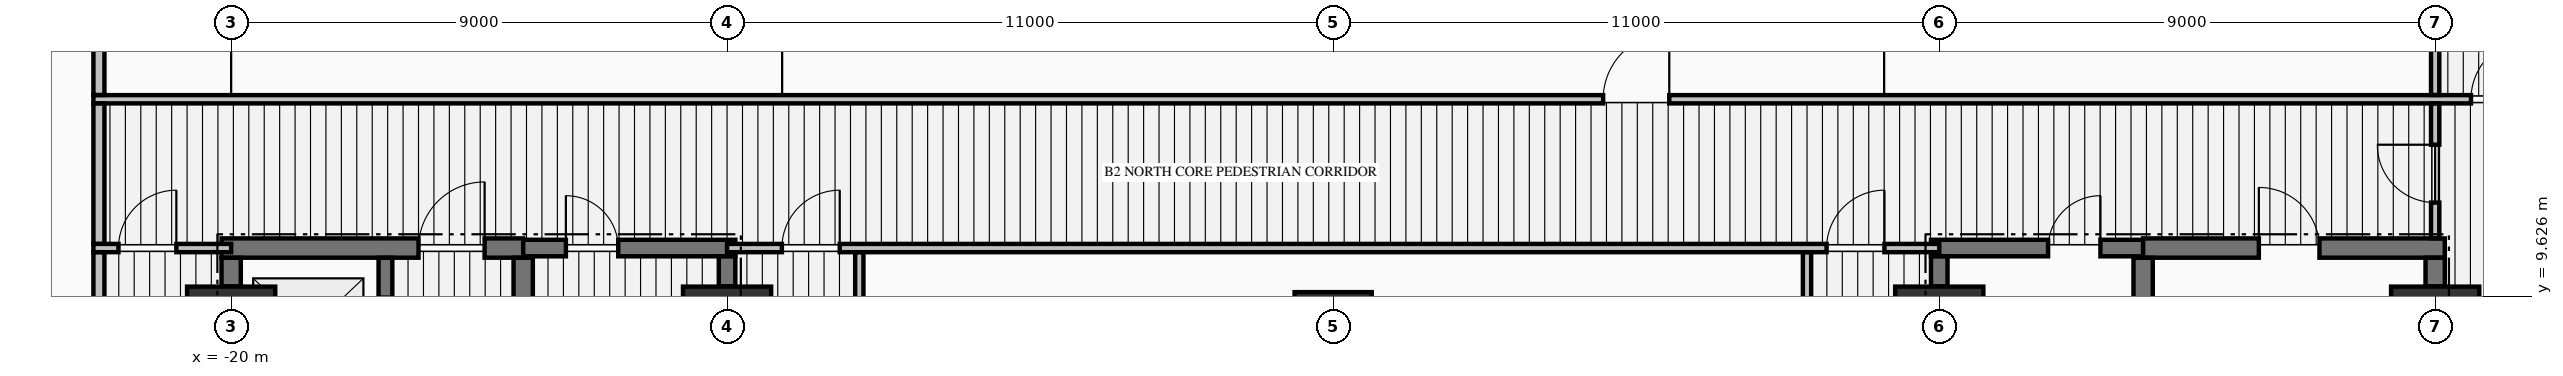
"""IFC4 building model, lengths in metres.
Left out: names, types, materials, properties, quantities, classifications, styles, units other than length and angle.
Written with IfcOpenShell. Run it as: python <this file> out.ifc"""

import sys

from ifc_helpers import new_model, si_unit, direction, frame, frame_2d, origin, origin_2d, place, context, subcontext, project, spatial, rectangle, extrude, element, fill, save


model = new_model("IFC4")
c1 = context("Model", 3, precision=1e-05, world=origin(), true_north=direction((0.0, 1.0)))
c2 = subcontext(c1, "Body", "Model", "MODEL_VIEW")
j1 = project(units=[si_unit("LENGTHUNIT", "METRE"), si_unit("PLANEANGLEUNIT", "RADIAN")], contexts=[c1])
p1 = place(None, origin())
s1 = spatial("IfcSite", under=j1, at=p1, CompositionType="ELEMENT")
p2 = place(p1, origin())
s2 = spatial("IfcBuilding", under=s1, at=p2, CompositionType="ELEMENT")
p3 = place(p2, frame((0.0, 0.0, -9.1)))
s3 = spatial("IfcBuildingStorey", under=s2, at=p3, CompositionType="ELEMENT", Elevation=-9.1)
for number, where, z_axis, x_axis in (
    (1, (-20.0, 9.0, -0.45), (0.0, 0.0, 1.0), (1.0, 0.0, 0.0)),
    (2, (-11.0, 9.0, -0.45), (0.0, 0.0, 1.0), (1.0, 0.0, 0.0)),
):
    element("IfcColumn", number, at=place(p3, frame(where, z_axis=z_axis, x_axis=x_axis)), inside=s3, PredefinedType="COLUMN", context=c2, shape_type="SweptSolid", body=[
        extrude(rectangle(XDim=1.6, YDim=1.6, at=origin_2d()), origin(), (0.0, 0.0, 1.0), 4.65),
    ])
p4 = place(p3, frame((0.0, 9.0, -0.45), z_axis=(0.0, 0.0, 1.0), x_axis=(1.0, 0.0, 0.0)))
e3 = element("IfcColumn", 3, at=p4, inside=s3, PredefinedType="COLUMN", context=c2, shape_type="SweptSolid", body=[
    extrude(rectangle(XDim=1.4, YDim=1.4, at=origin_2d()), origin(), (0.0, 0.0, 1.0), 4.65),
])
for number, where, z_axis, x_axis in (
    (4, (11.0, 9.0, -0.45), (0.0, 0.0, 1.0), (1.0, 0.0, 0.0)),
    (5, (20.0, 9.0, -0.45), (0.0, 0.0, 1.0), (1.0, 0.0, 0.0)),
):
    element("IfcColumn", number, at=place(p3, frame(where, z_axis=z_axis, x_axis=x_axis)), inside=s3, PredefinedType="COLUMN", context=c2, shape_type="SweptSolid", body=[
        extrude(rectangle(XDim=1.6, YDim=1.6, at=origin_2d()), origin(), (0.0, 0.0, 1.0), 4.65),
    ])
p5 = place(p3, frame((-20.175, 10.5, 0.0), z_axis=(0.0, 0.0, 1.0), x_axis=(1.0, 0.0, 0.0)))
e6 = element("IfcWall", 6, at=p5, inside=s3, PredefinedType="SHEAR", context=c2, shape_type="SweptSolid", body=[
    extrude(rectangle(XDim=5.475, YDim=0.35, at=frame_2d((2.738, 0.0))), origin(), (0.0, 0.0, 1.0), 4.2),
])
p6 = place(p5, frame((3.575, 0.0, 0.0)))
e7 = element("IfcOpeningElement", 7, at=p6, cuts=e6, PredefinedType="OPENING", context=c2, shape_type="SweptSolid", body=[
    extrude(rectangle(XDim=1.2, YDim=2.15, at=frame_2d((0.6, 1.075))), frame((0.0, 0.185, 0.0), z_axis=(0.0, -1.0, 0.0), x_axis=(1.0, 0.0, 0.0)), (0.0, 0.0, 1.0), 0.37),
])
p7 = place(p3, frame((-14.7, 10.5, 0.0), z_axis=(0.0, 0.0, 1.0), x_axis=(1.0, 0.0, 0.0)))
e8 = element("IfcWall", 8, at=p7, inside=s3, PredefinedType="SHEAR", context=c2, shape_type="SweptSolid", body=[
    extrude(rectangle(XDim=3.85, YDim=0.3, at=frame_2d((1.925, 0.0))), origin(), (0.0, 0.0, 1.0), 4.2),
])
p8 = place(p7, frame((0.775, 0.0, 0.0)))
e9 = element("IfcOpeningElement", 9, at=p8, cuts=e8, PredefinedType="OPENING", context=c2, shape_type="SweptSolid", body=[
    extrude(rectangle(XDim=0.95, YDim=2.15, at=frame_2d((0.475, 1.075))), frame((0.0, 0.16, 0.0), z_axis=(0.0, -1.0, 0.0), x_axis=(1.0, 0.0, 0.0)), (0.0, 0.0, 1.0), 0.32),
])
p9 = place(p3, frame((10.85, 10.5, 0.0), z_axis=(0.0, 0.0, 1.0), x_axis=(1.0, 0.0, 0.0)))
e10 = element("IfcWall", 10, at=p9, inside=s3, PredefinedType="SHEAR", context=c2, shape_type="SweptSolid", body=[
    extrude(rectangle(XDim=3.85, YDim=0.3, at=frame_2d((1.925, 0.0))), origin(), (0.0, 0.0, 1.0), 4.2),
])
p10 = place(p9, frame((2.125, 0.0, 0.0)))
e11 = element("IfcOpeningElement", 11, at=p10, cuts=e10, PredefinedType="OPENING", context=c2, shape_type="SweptSolid", body=[
    extrude(rectangle(XDim=0.95, YDim=2.15, at=frame_2d((0.475, 1.075))), frame((0.0, 0.16, 0.0), z_axis=(0.0, -1.0, 0.0), x_axis=(1.0, 0.0, 0.0)), (0.0, 0.0, 1.0), 0.32),
])
p11 = place(p3, frame((14.7, 10.5, 0.0), z_axis=(0.0, 0.0, 1.0), x_axis=(1.0, 0.0, 0.0)))
e12 = element("IfcWall", 12, at=p11, inside=s3, PredefinedType="SHEAR", context=c2, shape_type="SweptSolid", body=[
    extrude(rectangle(XDim=5.475, YDim=0.35, at=frame_2d((2.738, 0.0))), origin(), (0.0, 0.0, 1.0), 4.2),
])
p12 = place(p11, frame((2.1, 0.0, 0.0)))
e13 = element("IfcOpeningElement", 13, at=p12, cuts=e12, PredefinedType="OPENING", context=c2, shape_type="SweptSolid", body=[
    extrude(rectangle(XDim=1.1, YDim=2.15, at=frame_2d((0.55, 1.075))), frame((0.0, 0.185, 0.0), z_axis=(0.0, -1.0, 0.0), x_axis=(1.0, 0.0, 0.0)), (0.0, 0.0, 1.0), 0.37),
])
p13 = place(p3, frame((-22.5, 10.5, 0.0), z_axis=(0.0, 0.0, 1.0), x_axis=(1.0, 0.0, 0.0)))
e14 = element("IfcWall", 14, at=p13, inside=s3, PredefinedType="PARTITIONING", context=c2, shape_type="SweptSolid", body=[
    extrude(rectangle(XDim=2.5, YDim=0.15, at=frame_2d((1.25, 0.0))), origin(), (0.0, 0.0, 1.0), 4.2),
])
p14 = place(p13, frame((0.455, 0.0, 0.0)))
e15 = element("IfcOpeningElement", 15, at=p14, cuts=e14, PredefinedType="OPENING", context=c2, shape_type="SweptSolid", body=[
    extrude(rectangle(XDim=1.05, YDim=2.15, at=frame_2d((0.525, 1.075))), frame((0.0, 0.085, 0.0), z_axis=(0.0, -1.0, 0.0), x_axis=(1.0, 0.0, 0.0)), (0.0, 0.0, 1.0), 0.17),
])
p15 = place(p3, frame((-11.0, 10.5, 0.0), z_axis=(0.0, 0.0, 1.0), x_axis=(1.0, 0.0, 0.0)))
e16 = element("IfcWall", 16, at=p15, inside=s3, PredefinedType="PARTITIONING", context=c2, shape_type="SweptSolid", body=[
    extrude(rectangle(XDim=22.0, YDim=0.15, at=frame_2d((11.0, 0.0))), origin(), (0.0, 0.0, 1.0), 4.2),
])
p16 = place(p15, frame((0.995, 0.0, 0.0)))
e17 = element("IfcOpeningElement", 17, at=p16, cuts=e16, PredefinedType="OPENING", context=c2, shape_type="SweptSolid", body=[
    extrude(rectangle(XDim=1.05, YDim=2.15, at=frame_2d((0.525, 1.075))), frame((0.0, 0.085, 0.0), z_axis=(0.0, -1.0, 0.0), x_axis=(1.0, 0.0, 0.0)), (0.0, 0.0, 1.0), 0.17),
])
p17 = place(p15, frame((19.955, 0.0, 0.0)))
e18 = element("IfcOpeningElement", 18, at=p17, cuts=e16, PredefinedType="OPENING", context=c2, shape_type="SweptSolid", body=[
    extrude(rectangle(XDim=1.05, YDim=2.15, at=frame_2d((0.525, 1.075))), frame((0.0, 0.085, 0.0), z_axis=(0.0, -1.0, 0.0), x_axis=(1.0, 0.0, 0.0)), (0.0, 0.0, 1.0), 0.17),
])
p18 = place(p3, frame((-22.5, 13.2, 0.0), z_axis=(0.0, 0.0, 1.0), x_axis=(1.0, 0.0, 0.0)))
e19 = element("IfcWall", 19, at=p18, inside=s3, PredefinedType="PARTITIONING", context=c2, shape_type="SweptSolid", body=[
    extrude(rectangle(XDim=45.0, YDim=0.15, at=frame_2d((22.5, 0.0))), origin(), (0.0, 0.0, 1.0), 4.2),
])
p19 = place(p18, frame((43.15, 0.0, 0.0)))
e20 = element("IfcOpeningElement", 20, at=p19, cuts=e19, PredefinedType="OPENING", context=c2, shape_type="SweptSolid", body=[
    extrude(rectangle(XDim=1.1, YDim=2.15, at=frame_2d((0.55, 1.075))), frame((0.0, 0.085, 0.0), z_axis=(0.0, -1.0, 0.0), x_axis=(1.0, 0.0, 0.0)), (0.0, 0.0, 1.0), 0.17),
])
p20 = place(p18, frame((27.4, 0.0, 0.0)))
e21 = element("IfcOpeningElement", 21, at=p20, cuts=e19, PredefinedType="OPENING", context=c2, shape_type="SweptSolid", body=[
    extrude(rectangle(XDim=1.2, YDim=2.15, at=frame_2d((0.6, 1.075))), frame((0.0, 0.085, 0.0), z_axis=(0.0, -1.0, 0.0), x_axis=(1.0, 0.0, 0.0)), (0.0, 0.0, 1.0), 0.17),
])
p21 = place(p3, frame((-20.0, 9.804, 0.0), z_axis=(0.0, 0.0, 1.0), x_axis=(0.0, 1.0, 0.0)))
e22 = element("IfcWall", 22, at=p21, inside=s3, PredefinedType="SHEAR", context=c2, shape_type="SweptSolid", body=[
    extrude(rectangle(XDim=0.519, YDim=0.35, at=frame_2d((0.26, 0.0))), origin(), (0.0, 0.0, 1.0), 4.2),
])
p22 = place(p3, frame((-17.2, 7.727, 0.0), z_axis=(0.0, 0.0, 1.0), x_axis=(0.0, 1.0, 0.0)))
e23 = element("IfcWall", 23, at=p22, inside=s3, PredefinedType="SOLIDWALL", context=c2, shape_type="SweptSolid", body=[
    extrude(rectangle(XDim=2.596, YDim=0.25, at=frame_2d((1.298, 0.0))), origin(), (0.0, 0.0, 1.0), 4.2),
])
p23 = place(p22, frame((0.773, 0.0, 0.0)))
e24 = element("IfcOpeningElement", 24, at=p23, cuts=e23, PredefinedType="OPENING", context=c2, shape_type="SweptSolid", body=[
    extrude(rectangle(XDim=1.1, YDim=2.2, at=frame_2d((0.55, 1.1))), frame((0.0, 0.135, 0.0), z_axis=(0.0, -1.0, 0.0), x_axis=(1.0, 0.0, 0.0)), (0.0, 0.0, 1.0), 0.27),
])
p24 = place(p3, frame((-14.7, 5.852, 0.0), z_axis=(0.0, 0.0, 1.0), x_axis=(0.0, 1.0, 0.0)))
e25 = element("IfcWall", 25, at=p24, inside=s3, PredefinedType="SHEAR", context=c2, shape_type="SweptSolid", body=[
    extrude(rectangle(XDim=4.471, YDim=0.35, at=frame_2d((2.235, 0.0))), origin(), (0.0, 0.0, 1.0), 4.2),
])
for number, where, z_axis, x_axis in (
    (26, (-11.0, 9.804, 0.0), (0.0, 0.0, 1.0), (0.0, 1.0, 0.0)),
    (27, (11.0, 9.804, 0.0), (0.0, 0.0, 1.0), (0.0, 1.0, 0.0)),
):
    element("IfcWall", number, at=place(p3, frame(where, z_axis=z_axis, x_axis=x_axis)), inside=s3, PredefinedType="SHEAR", context=c2, shape_type="SweptSolid", body=[
        extrude(rectangle(XDim=0.544, YDim=0.3, at=frame_2d((0.272, 0.0))), origin(), (0.0, 0.0, 1.0), 4.2),
    ])
p25 = place(p3, frame((14.7, 5.852, 0.0), z_axis=(0.0, 0.0, 1.0), x_axis=(0.0, 1.0, 0.0)))
e28 = element("IfcWall", 28, at=p25, inside=s3, PredefinedType="SHEAR", context=c2, shape_type="SweptSolid", body=[
    extrude(rectangle(XDim=4.471, YDim=0.35, at=frame_2d((2.235, 0.0))), origin(), (0.0, 0.0, 1.0), 4.2),
])
p26 = place(p3, frame((20.0, 9.804, 0.0), z_axis=(0.0, 0.0, 1.0), x_axis=(0.0, 1.0, 0.0)))
e29 = element("IfcWall", 29, at=p26, inside=s3, PredefinedType="SHEAR", context=c2, shape_type="SweptSolid", body=[
    extrude(rectangle(XDim=0.519, YDim=0.35, at=frame_2d((0.26, 0.0))), origin(), (0.0, 0.0, 1.0), 4.2),
])
p27 = place(p3, frame((-22.4, -0.647, 0.0), z_axis=(0.0, 0.0, 1.0), x_axis=(0.0, 1.0, 0.0)))
e30 = element("IfcWall", 30, at=p27, inside=s3, PredefinedType="PARTITIONING", context=c2, shape_type="SweptSolid", body=[
    extrude(rectangle(XDim=11.069, YDim=0.2, at=frame_2d((5.535, 0.0))), origin(), (0.0, 0.0, 1.0), 4.2),
])
p28 = place(p27, frame((4.547, 0.0, 0.0)))
e31 = element("IfcOpeningElement", 31, at=p28, cuts=e30, PredefinedType="OPENING", context=c2, shape_type="SweptSolid", body=[
    extrude(rectangle(XDim=1.2, YDim=2.15, at=frame_2d((0.6, 1.075))), frame((0.0, 0.11, 0.0), z_axis=(0.0, -1.0, 0.0), x_axis=(1.0, 0.0, 0.0)), (0.0, 0.0, 1.0), 0.22),
])
p29 = place(p3, frame((-22.4, 10.578, 0.0), z_axis=(0.0, 0.0, 1.0), x_axis=(0.0, 1.0, 0.0)))
e32 = element("IfcWall", 32, at=p29, inside=s3, PredefinedType="PARTITIONING", context=c2, shape_type="SweptSolid", body=[
    extrude(rectangle(XDim=2.544, YDim=0.2, at=frame_2d((1.272, 0.0))), origin(), (0.0, 0.0, 1.0), 4.2),
])
p30 = place(p3, frame((-22.4, 13.278, 0.0), z_axis=(0.0, 0.0, 1.0), x_axis=(0.0, 1.0, 0.0)))
e33 = element("IfcWall", 33, at=p30, inside=s3, PredefinedType="PARTITIONING", context=c2, shape_type="SweptSolid", body=[
    extrude(rectangle(XDim=3.269, YDim=0.2, at=frame_2d((1.635, 0.0))), origin(), (0.0, 0.0, 1.0), 4.2),
])
p31 = place(p3, frame((-8.6, 0.606, 0.0), z_axis=(0.0, 0.0, 1.0), x_axis=(0.0, 1.0, 0.0)))
e34 = element("IfcWall", 34, at=p31, inside=s3, PredefinedType="PARTITIONING", context=c2, shape_type="SweptSolid", body=[
    extrude(rectangle(XDim=9.816, YDim=0.15, at=frame_2d((4.908, 0.0))), origin(), (0.0, 0.0, 1.0), 3.242),
])
p32 = place(p31, frame((3.344, 0.0, 0.0)))
e35 = element("IfcOpeningElement", 35, at=p32, cuts=e34, PredefinedType="OPENING", context=c2, shape_type="SweptSolid", body=[
    extrude(rectangle(XDim=1.1, YDim=2.15, at=frame_2d((0.55, 1.075))), frame((0.0, 0.085, 0.0), z_axis=(0.0, -1.0, 0.0), x_axis=(1.0, 0.0, 0.0)), (0.0, 0.0, 1.0), 0.17),
])
p33 = place(p3, frame((8.6, 0.606, 0.0), z_axis=(0.0, 0.0, 1.0), x_axis=(0.0, 1.0, 0.0)))
e36 = element("IfcWall", 36, at=p33, inside=s3, PredefinedType="PARTITIONING", context=c2, shape_type="SweptSolid", body=[
    extrude(rectangle(XDim=9.816, YDim=0.15, at=frame_2d((4.908, 0.0))), origin(), (0.0, 0.0, 1.0), 3.242),
])
p34 = place(p33, frame((3.344, 0.0, 0.0)))
e37 = element("IfcOpeningElement", 37, at=p34, cuts=e36, PredefinedType="OPENING", context=c2, shape_type="SweptSolid", body=[
    extrude(rectangle(XDim=1.1, YDim=2.15, at=frame_2d((0.55, 1.075))), frame((0.0, 0.085, 0.0), z_axis=(0.0, -1.0, 0.0), x_axis=(1.0, 0.0, 0.0)), (0.0, 0.0, 1.0), 0.17),
])
p35 = place(p3, frame((20.0, 10.678, 0.0), z_axis=(0.0, 0.0, 1.0), x_axis=(0.0, 1.0, 0.0)))
e38 = element("IfcWall", 38, at=p35, inside=s3, PredefinedType="PARTITIONING", context=c2, shape_type="SweptSolid", body=[
    extrude(rectangle(XDim=2.444, YDim=0.15, at=frame_2d((1.222, 0.0))), origin(), (0.0, 0.0, 1.0), 3.242),
])
p36 = place(p35, frame((0.647, 0.0, 0.0)))
e39 = element("IfcOpeningElement", 39, at=p36, cuts=e38, PredefinedType="OPENING", context=c2, shape_type="SweptSolid", body=[
    extrude(rectangle(XDim=1.05, YDim=2.15, at=frame_2d((0.525, 1.075))), frame((0.0, 0.085, 0.0), z_axis=(0.0, -1.0, 0.0), x_axis=(1.0, 0.0, 0.0)), (0.0, 0.0, 1.0), 0.17),
])
p37 = place(p3, frame((20.0, 13.278, 0.0), z_axis=(0.0, 0.0, 1.0), x_axis=(0.0, 1.0, 0.0)))
e40 = element("IfcWall", 40, at=p37, inside=s3, PredefinedType="PARTITIONING", context=c2, shape_type="SweptSolid", body=[
    extrude(rectangle(XDim=1.916, YDim=0.15, at=frame_2d((0.958, 0.0))), origin(), (0.0, 0.0, 1.0), 3.242),
])
p38 = place(p8, origin())
e41 = element("IfcDoor", 41, at=p38, inside=s3, OperationType="SINGLE_SWING_LEFT", PredefinedType="DOOR", context=c2, shape_type="SweptSolid", body=[
    extrude(rectangle(XDim=0.95, YDim=2.15, at=frame_2d((0.475, 1.075))), frame((0.0, 0.025, 0.0), z_axis=(0.0, -1.0, 0.0), x_axis=(1.0, 0.0, 0.0)), (0.0, 0.0, 1.0), 0.05),
])
fill(e9, e41)
p39 = place(p10, origin())
e42 = element("IfcDoor", 42, at=p39, inside=s3, OperationType="SINGLE_SWING_RIGHT", PredefinedType="DOOR", context=c2, shape_type="SweptSolid", body=[
    extrude(rectangle(XDim=0.95, YDim=2.15, at=frame_2d((0.475, 1.075))), frame((0.0, 0.025, 0.0), z_axis=(0.0, -1.0, 0.0), x_axis=(1.0, 0.0, 0.0)), (0.0, 0.0, 1.0), 0.05),
])
fill(e11, e42)
p40 = place(p6, origin())
e43 = element("IfcDoor", 43, at=p40, inside=s3, OperationType="SINGLE_SWING_RIGHT", PredefinedType="DOOR", context=c2, shape_type="SweptSolid", body=[
    extrude(rectangle(XDim=1.2, YDim=2.15, at=frame_2d((0.6, 1.075))), frame((0.0, 0.025, 0.0), z_axis=(0.0, -1.0, 0.0), x_axis=(1.0, 0.0, 0.0)), (0.0, 0.0, 1.0), 0.05),
])
fill(e7, e43)
p41 = place(p12, origin())
e44 = element("IfcDoor", 44, at=p41, inside=s3, OperationType="SINGLE_SWING_LEFT", PredefinedType="DOOR", context=c2, shape_type="SweptSolid", body=[
    extrude(rectangle(XDim=1.1, YDim=2.15, at=frame_2d((0.55, 1.075))), frame((0.0, 0.025, 0.0), z_axis=(0.0, -1.0, 0.0), x_axis=(1.0, 0.0, 0.0)), (0.0, 0.0, 1.0), 0.05),
])
fill(e13, e44)
p42 = place(p16, origin())
e45 = element("IfcDoor", 45, at=p42, inside=s3, OperationType="SINGLE_SWING_RIGHT", PredefinedType="DOOR", context=c2, shape_type="SweptSolid", body=[
    extrude(rectangle(XDim=1.05, YDim=2.15, at=frame_2d((0.525, 1.075))), frame((0.0, 0.025, 0.0), z_axis=(0.0, -1.0, 0.0), x_axis=(1.0, 0.0, 0.0)), (0.0, 0.0, 1.0), 0.05),
])
fill(e17, e45)
p43 = place(p17, origin())
e46 = element("IfcDoor", 46, at=p43, inside=s3, OperationType="SINGLE_SWING_RIGHT", PredefinedType="DOOR", context=c2, shape_type="SweptSolid", body=[
    extrude(rectangle(XDim=1.05, YDim=2.15, at=frame_2d((0.525, 1.075))), frame((0.0, 0.025, 0.0), z_axis=(0.0, -1.0, 0.0), x_axis=(1.0, 0.0, 0.0)), (0.0, 0.0, 1.0), 0.05),
])
fill(e18, e46)
p44 = place(p14, origin())
e47 = element("IfcDoor", 47, at=p44, inside=s3, OperationType="SINGLE_SWING_RIGHT", PredefinedType="DOOR", context=c2, shape_type="SweptSolid", body=[
    extrude(rectangle(XDim=1.05, YDim=2.15, at=frame_2d((0.525, 1.075))), frame((0.0, 0.025, 0.0), z_axis=(0.0, -1.0, 0.0), x_axis=(1.0, 0.0, 0.0)), (0.0, 0.0, 1.0), 0.05),
])
fill(e15, e47)
p45 = place(p36, origin())
e48 = element("IfcDoor", 48, at=p45, inside=s3, OperationType="SINGLE_SWING_RIGHT", PredefinedType="DOOR", context=c2, shape_type="SweptSolid", body=[
    extrude(rectangle(XDim=1.05, YDim=2.15, at=frame_2d((0.525, 1.075))), frame((0.0, 0.025, 0.0), z_axis=(0.0, -1.0, 0.0), x_axis=(1.0, 0.0, 0.0)), (0.0, 0.0, 1.0), 0.05),
])
fill(e39, e48)
p46 = place(p19, origin())
e49 = element("IfcDoor", 49, at=p46, inside=s3, OperationType="SINGLE_SWING_RIGHT", PredefinedType="DOOR", context=c2, shape_type="SweptSolid", body=[
    extrude(rectangle(XDim=1.1, YDim=2.15, at=frame_2d((0.55, 1.075))), frame((0.0, 0.025, 0.0), z_axis=(0.0, -1.0, 0.0), x_axis=(1.0, 0.0, 0.0)), (0.0, 0.0, 1.0), 0.05),
])
fill(e20, e49)
p47 = place(p20, origin())
e50 = element("IfcDoor", 50, at=p47, inside=s3, OperationType="SINGLE_SWING_RIGHT", PredefinedType="DOOR", context=c2, shape_type="SweptSolid", body=[
    extrude(rectangle(XDim=1.2, YDim=2.15, at=frame_2d((0.6, 1.075))), frame((0.0, 0.025, 0.0), z_axis=(0.0, -1.0, 0.0), x_axis=(1.0, 0.0, 0.0)), (0.0, 0.0, 1.0), 0.05),
])
fill(e21, e50)
save(model, sys.argv[1])
